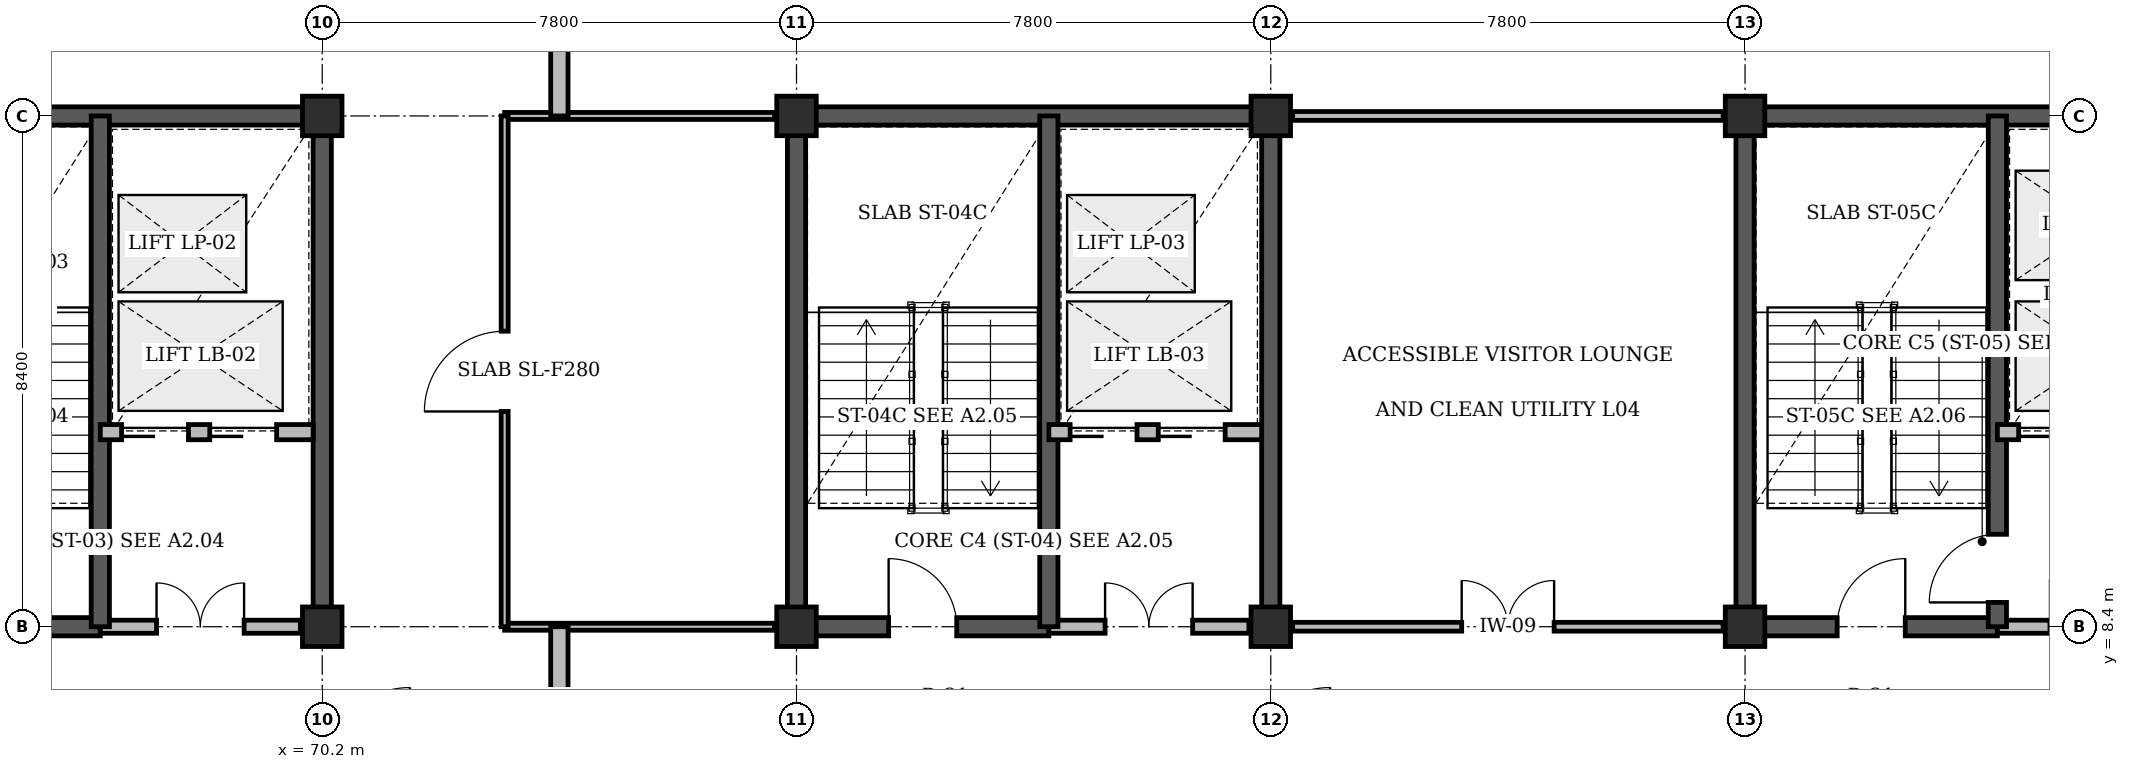
"""IFC4 building model, lengths in metres.
Left out: names, types, materials, properties, quantities, classifications, styles, units other than length and angle.
Written with IfcOpenShell. Run it as: python <this file> out.ifc"""

import sys

from ifc_helpers import new_model, si_unit, direction, frame, frame_2d, origin, origin_2d, place, context, subcontext, project, spatial, rectangle, extrude, element, fill, save


model = new_model("IFC4")
c1 = context("Model", 3, precision=1e-05, world=origin(), true_north=direction((0.0, 1.0)))
c2 = subcontext(c1, "Body", "Model", "MODEL_VIEW")
j1 = project(units=[si_unit("LENGTHUNIT", "METRE"), si_unit("PLANEANGLEUNIT", "RADIAN")], contexts=[c1])
p1 = place(None, origin())
s1 = spatial("IfcSite", under=j1, at=p1, CompositionType="ELEMENT")
p2 = place(p1, origin())
s2 = spatial("IfcBuilding", under=s1, at=p2, CompositionType="ELEMENT")
p3 = place(p2, frame((0.0, 0.0, 18.0)))
s3 = spatial("IfcBuildingStorey", under=s2, at=p3, CompositionType="ELEMENT", Elevation=18.0)
p4 = place(p3, frame((62.25, 16.8, 0.0), z_axis=(0.0, 0.0, 1.0), x_axis=(1.0, 0.0, 0.0)))
e1 = element("IfcWall", 1, at=p4, inside=s3, PredefinedType="SHEAR", context=c2, shape_type="SweptSolid", body=[
    extrude(rectangle(XDim=8.1, YDim=0.3, at=frame_2d((4.05, 0.0))), origin(), (0.0, 0.0, 1.0), 3.92),
])
p5 = place(p3, frame((70.2, 8.4, 0.0), z_axis=(0.0, 0.0, 1.0), x_axis=(0.0, 1.0, 0.0)))
e2 = element("IfcWall", 2, at=p5, inside=s3, PredefinedType="SHEAR", context=c2, shape_type="SweptSolid", body=[
    extrude(rectangle(XDim=8.4, YDim=0.3, at=frame_2d((4.2, 0.0))), origin(), (0.0, 0.0, 1.0), 3.92),
])
p6 = place(p3, frame((77.85, 16.8, 0.0), z_axis=(0.0, 0.0, 1.0), x_axis=(1.0, 0.0, 0.0)))
e3 = element("IfcWall", 3, at=p6, inside=s3, PredefinedType="SHEAR", context=c2, shape_type="SweptSolid", body=[
    extrude(rectangle(XDim=8.1, YDim=0.3, at=frame_2d((4.05, 0.0))), origin(), (0.0, 0.0, 1.0), 3.92),
])
for number, where, z_axis, x_axis in (
    (4, (78.0, 8.4, 0.0), (0.0, 0.0, 1.0), (0.0, 1.0, 0.0)),
    (5, (85.8, 8.4, 0.0), (0.0, 0.0, 1.0), (0.0, 1.0, 0.0)),
):
    element("IfcWall", number, at=place(p3, frame(where, z_axis=z_axis, x_axis=x_axis)), inside=s3, PredefinedType="SHEAR", context=c2, shape_type="SweptSolid", body=[
        extrude(rectangle(XDim=8.4, YDim=0.3, at=frame_2d((4.2, 0.0))), origin(), (0.0, 0.0, 1.0), 3.92),
    ])
p7 = place(p3, frame((93.45, 16.8, 0.0), z_axis=(0.0, 0.0, 1.0), x_axis=(1.0, 0.0, 0.0)))
e6 = element("IfcWall", 6, at=p7, inside=s3, PredefinedType="SHEAR", context=c2, shape_type="SweptSolid", body=[
    extrude(rectangle(XDim=8.1, YDim=0.3, at=frame_2d((4.05, 0.0))), origin(), (0.0, 0.0, 1.0), 3.92),
])
p8 = place(p3, frame((93.6, 8.4, 0.0), z_axis=(0.0, 0.0, 1.0), x_axis=(0.0, 1.0, 0.0)))
e7 = element("IfcWall", 7, at=p8, inside=s3, PredefinedType="SHEAR", context=c2, shape_type="SweptSolid", body=[
    extrude(rectangle(XDim=8.4, YDim=0.3, at=frame_2d((4.2, 0.0))), origin(), (0.0, 0.0, 1.0), 3.92),
])
for number, where, z_axis, x_axis in (
    (8, (70.2, 8.4, 0.0), (0.0, 0.0, 1.0), (1.0, 0.0, 0.0)),
    (9, (70.2, 16.8, 0.0), (0.0, 0.0, 1.0), (1.0, 0.0, 0.0)),
    (10, (78.0, 8.4, 0.0), (0.0, 0.0, 1.0), (1.0, 0.0, 0.0)),
    (11, (78.0, 16.8, 0.0), (0.0, 0.0, 1.0), (1.0, 0.0, 0.0)),
    (12, (85.8, 8.4, 0.0), (0.0, 0.0, 1.0), (1.0, 0.0, 0.0)),
    (13, (85.8, 16.8, 0.0), (0.0, 0.0, 1.0), (1.0, 0.0, 0.0)),
    (14, (93.6, 8.4, 0.0), (0.0, 0.0, 1.0), (1.0, 0.0, 0.0)),
    (15, (93.6, 16.8, 0.0), (0.0, 0.0, 1.0), (1.0, 0.0, 0.0)),
):
    element("IfcColumn", number, at=place(p3, frame(where, z_axis=z_axis, x_axis=x_axis)), inside=s3, PredefinedType="COLUMN", context=c2, shape_type="SweptSolid", body=[
        extrude(rectangle(XDim=0.65, YDim=0.65, at=origin_2d()), origin(), (0.0, 0.0, 1.0), 4.2),
    ])
p9 = place(p3, frame((62.4, 8.4, 0.0), z_axis=(0.0, 0.0, 1.0), x_axis=(1.0, 0.0, 0.0)))
e16 = element("IfcWall", 16, at=p9, inside=s3, PredefinedType="SHEAR", context=c2, shape_type="SweptSolid", body=[
    extrude(rectangle(XDim=4.15, YDim=0.3, at=frame_2d((2.075, 0.0))), origin(), (0.0, 0.0, 1.0), 4.2),
])
p10 = place(p9, frame((1.515, 0.0, 0.0)))
e17 = element("IfcOpeningElement", 17, at=p10, cuts=e16, PredefinedType="OPENING", context=c2, shape_type="SweptSolid", body=[
    extrude(rectangle(XDim=1.12, YDim=2.15, at=frame_2d((0.56, 1.075))), frame((0.0, 0.16, 0.0), z_axis=(0.0, -1.0, 0.0), x_axis=(1.0, 0.0, 0.0)), (0.0, 0.0, 1.0), 0.32),
])
p11 = place(p3, frame((66.55, 8.4, 0.0), z_axis=(0.0, 0.0, 1.0), x_axis=(1.0, 0.0, 0.0)))
e18 = element("IfcWall", 18, at=p11, inside=s3, PredefinedType="STANDARD", context=c2, shape_type="SweptSolid", body=[
    extrude(rectangle(XDim=3.29, YDim=0.215, at=frame_2d((1.645, 0.0))), origin(), (0.0, 0.0, 1.0), 3.22),
])
p12 = place(p11, frame((0.925, 0.0, 0.0)))
e19 = element("IfcOpeningElement", 19, at=p12, cuts=e18, PredefinedType="OPENING", context=c2, shape_type="SweptSolid", body=[
    extrude(rectangle(XDim=1.44, YDim=2.2, at=frame_2d((0.72, 1.1))), frame((0.0, 0.118, 0.0), z_axis=(0.0, -1.0, 0.0), x_axis=(1.0, 0.0, 0.0)), (0.0, 0.0, 1.0), 0.235),
])
p13 = place(p3, frame((66.55, 8.4, 0.0), z_axis=(0.0, 0.0, 1.0), x_axis=(0.0, 1.0, 0.0)))
e20 = element("IfcWall", 20, at=p13, inside=s3, PredefinedType="SHEAR", context=c2, shape_type="SweptSolid", body=[
    extrude(rectangle(XDim=8.4, YDim=0.3, at=frame_2d((4.2, 0.0))), origin(), (0.0, 0.0, 1.0), 4.2),
])
p14 = place(p3, frame((66.55, 11.6, 0.0), z_axis=(0.0, 0.0, 1.0), x_axis=(1.0, 0.0, 0.0)))
e21 = element("IfcWall", 21, at=p14, inside=s3, PredefinedType="STANDARD", context=c2, shape_type="SweptSolid", body=[
    extrude(rectangle(XDim=3.5, YDim=0.25, at=frame_2d((1.75, 0.0))), origin(), (0.0, 0.0, 1.0), 3.9),
])
p15 = place(p14, frame((0.35, 0.0, 0.0)))
e22 = element("IfcOpeningElement", 22, at=p15, cuts=e21, PredefinedType="OPENING", context=c2, shape_type="SweptSolid", body=[
    extrude(rectangle(XDim=1.1, YDim=2.2, at=frame_2d((0.55, 1.1))), frame((0.0, 0.135, 0.0), z_axis=(0.0, -1.0, 0.0), x_axis=(1.0, 0.0, 0.0)), (0.0, 0.0, 1.0), 0.27),
])
p16 = place(p14, frame((1.8, 0.0, 0.0)))
e23 = element("IfcOpeningElement", 23, at=p16, cuts=e21, PredefinedType="OPENING", context=c2, shape_type="SweptSolid", body=[
    extrude(rectangle(XDim=1.1, YDim=2.2, at=frame_2d((0.55, 1.1))), frame((0.0, 0.135, 0.0), z_axis=(0.0, -1.0, 0.0), x_axis=(1.0, 0.0, 0.0)), (0.0, 0.0, 1.0), 0.27),
])
p17 = place(p3, frame((78.0, 8.4, 0.0), z_axis=(0.0, 0.0, 1.0), x_axis=(1.0, 0.0, 0.0)))
e24 = element("IfcWall", 24, at=p17, inside=s3, PredefinedType="SHEAR", context=c2, shape_type="SweptSolid", body=[
    extrude(rectangle(XDim=4.15, YDim=0.3, at=frame_2d((2.075, 0.0))), origin(), (0.0, 0.0, 1.0), 4.2),
])
p18 = place(p17, frame((1.515, 0.0, 0.0)))
e25 = element("IfcOpeningElement", 25, at=p18, cuts=e24, PredefinedType="OPENING", context=c2, shape_type="SweptSolid", body=[
    extrude(rectangle(XDim=1.12, YDim=2.15, at=frame_2d((0.56, 1.075))), frame((0.0, 0.16, 0.0), z_axis=(0.0, -1.0, 0.0), x_axis=(1.0, 0.0, 0.0)), (0.0, 0.0, 1.0), 0.32),
])
p19 = place(p3, frame((82.15, 8.4, 0.0), z_axis=(0.0, 0.0, 1.0), x_axis=(1.0, 0.0, 0.0)))
e26 = element("IfcWall", 26, at=p19, inside=s3, PredefinedType="STANDARD", context=c2, shape_type="SweptSolid", body=[
    extrude(rectangle(XDim=3.29, YDim=0.215, at=frame_2d((1.645, 0.0))), origin(), (0.0, 0.0, 1.0), 3.22),
])
p20 = place(p19, frame((0.925, 0.0, 0.0)))
e27 = element("IfcOpeningElement", 27, at=p20, cuts=e26, PredefinedType="OPENING", context=c2, shape_type="SweptSolid", body=[
    extrude(rectangle(XDim=1.44, YDim=2.2, at=frame_2d((0.72, 1.1))), frame((0.0, 0.118, 0.0), z_axis=(0.0, -1.0, 0.0), x_axis=(1.0, 0.0, 0.0)), (0.0, 0.0, 1.0), 0.235),
])
p21 = place(p3, frame((82.15, 8.4, 0.0), z_axis=(0.0, 0.0, 1.0), x_axis=(0.0, 1.0, 0.0)))
e28 = element("IfcWall", 28, at=p21, inside=s3, PredefinedType="SHEAR", context=c2, shape_type="SweptSolid", body=[
    extrude(rectangle(XDim=8.4, YDim=0.3, at=frame_2d((4.2, 0.0))), origin(), (0.0, 0.0, 1.0), 4.2),
])
p22 = place(p3, frame((82.15, 11.6, 0.0), z_axis=(0.0, 0.0, 1.0), x_axis=(1.0, 0.0, 0.0)))
e29 = element("IfcWall", 29, at=p22, inside=s3, PredefinedType="STANDARD", context=c2, shape_type="SweptSolid", body=[
    extrude(rectangle(XDim=3.5, YDim=0.25, at=frame_2d((1.75, 0.0))), origin(), (0.0, 0.0, 1.0), 3.9),
])
p23 = place(p22, frame((0.35, 0.0, 0.0)))
e30 = element("IfcOpeningElement", 30, at=p23, cuts=e29, PredefinedType="OPENING", context=c2, shape_type="SweptSolid", body=[
    extrude(rectangle(XDim=1.1, YDim=2.2, at=frame_2d((0.55, 1.1))), frame((0.0, 0.135, 0.0), z_axis=(0.0, -1.0, 0.0), x_axis=(1.0, 0.0, 0.0)), (0.0, 0.0, 1.0), 0.27),
])
p24 = place(p22, frame((1.8, 0.0, 0.0)))
e31 = element("IfcOpeningElement", 31, at=p24, cuts=e29, PredefinedType="OPENING", context=c2, shape_type="SweptSolid", body=[
    extrude(rectangle(XDim=1.1, YDim=2.2, at=frame_2d((0.55, 1.1))), frame((0.0, 0.135, 0.0), z_axis=(0.0, -1.0, 0.0), x_axis=(1.0, 0.0, 0.0)), (0.0, 0.0, 1.0), 0.27),
])
p25 = place(p3, frame((93.6, 8.4, 0.0), z_axis=(0.0, 0.0, 1.0), x_axis=(1.0, 0.0, 0.0)))
e32 = element("IfcWall", 32, at=p25, inside=s3, PredefinedType="SHEAR", context=c2, shape_type="SweptSolid", body=[
    extrude(rectangle(XDim=4.15, YDim=0.3, at=frame_2d((2.075, 0.0))), origin(), (0.0, 0.0, 1.0), 4.2),
])
p26 = place(p25, frame((1.515, 0.0, 0.0)))
e33 = element("IfcOpeningElement", 33, at=p26, cuts=e32, PredefinedType="OPENING", context=c2, shape_type="SweptSolid", body=[
    extrude(rectangle(XDim=1.12, YDim=2.15, at=frame_2d((0.56, 1.075))), frame((0.0, 0.16, 0.0), z_axis=(0.0, -1.0, 0.0), x_axis=(1.0, 0.0, 0.0)), (0.0, 0.0, 1.0), 0.32),
])
p27 = place(p3, frame((97.75, 8.4, 0.0), z_axis=(0.0, 0.0, 1.0), x_axis=(1.0, 0.0, 0.0)))
e34 = element("IfcWall", 34, at=p27, inside=s3, PredefinedType="STANDARD", context=c2, shape_type="SweptSolid", body=[
    extrude(rectangle(XDim=3.29, YDim=0.215, at=frame_2d((1.645, 0.0))), origin(), (0.0, 0.0, 1.0), 3.22),
])
p28 = place(p27, frame((0.865, 0.0, 0.0)))
e35 = element("IfcOpeningElement", 35, at=p28, cuts=e34, PredefinedType="OPENING", context=c2, shape_type="SweptSolid", body=[
    extrude(rectangle(XDim=1.56, YDim=2.2, at=frame_2d((0.78, 1.1))), frame((0.0, 0.118, 0.0), z_axis=(0.0, -1.0, 0.0), x_axis=(1.0, 0.0, 0.0)), (0.0, 0.0, 1.0), 0.235),
])
p29 = place(p3, frame((97.75, 8.4, 0.0), z_axis=(0.0, 0.0, 1.0), x_axis=(0.0, 1.0, 0.0)))
e36 = element("IfcWall", 36, at=p29, inside=s3, PredefinedType="SHEAR", context=c2, shape_type="SweptSolid", body=[
    extrude(rectangle(XDim=8.4, YDim=0.3, at=frame_2d((4.2, 0.0))), origin(), (0.0, 0.0, 1.0), 4.2),
])
p30 = place(p29, frame((0.4, 0.0, 0.0)))
e37 = element("IfcOpeningElement", 37, at=p30, cuts=e36, PredefinedType="OPENING", context=c2, shape_type="SweptSolid", body=[
    extrude(rectangle(XDim=1.12, YDim=2.15, at=frame_2d((0.56, 1.075))), frame((0.0, 0.16, 0.0), z_axis=(0.0, -1.0, 0.0), x_axis=(1.0, 0.0, 0.0)), (0.0, 0.0, 1.0), 0.32),
])
p31 = place(p3, frame((97.75, 11.6, 0.0), z_axis=(0.0, 0.0, 1.0), x_axis=(1.0, 0.0, 0.0)))
e38 = element("IfcWall", 38, at=p31, inside=s3, PredefinedType="STANDARD", context=c2, shape_type="SweptSolid", body=[
    extrude(rectangle(XDim=3.5, YDim=0.25, at=frame_2d((1.75, 0.0))), origin(), (0.0, 0.0, 1.0), 3.9),
])
p32 = place(p31, frame((0.35, 0.0, 0.0)))
e39 = element("IfcOpeningElement", 39, at=p32, cuts=e38, PredefinedType="OPENING", context=c2, shape_type="SweptSolid", body=[
    extrude(rectangle(XDim=1.1, YDim=2.2, at=frame_2d((0.55, 1.1))), frame((0.0, 0.135, 0.0), z_axis=(0.0, -1.0, 0.0), x_axis=(1.0, 0.0, 0.0)), (0.0, 0.0, 1.0), 0.27),
])
p33 = place(p31, frame((1.8, 0.0, 0.0)))
e40 = element("IfcOpeningElement", 40, at=p33, cuts=e38, PredefinedType="OPENING", context=c2, shape_type="SweptSolid", body=[
    extrude(rectangle(XDim=1.1, YDim=2.2, at=frame_2d((0.55, 1.1))), frame((0.0, 0.135, 0.0), z_axis=(0.0, -1.0, 0.0), x_axis=(1.0, 0.0, 0.0)), (0.0, 0.0, 1.0), 0.27),
])
for number, where, z_axis, x_axis in (
    (41, (73.2, 8.4, 0.0), (0.0, 0.0, 1.0), (1.0, 0.0, 0.0)),
    (42, (73.2, 16.8, 0.0), (0.0, 0.0, 1.0), (1.0, 0.0, 0.0)),
):
    element("IfcWall", number, at=place(p3, frame(where, z_axis=z_axis, x_axis=x_axis)), inside=s3, PredefinedType="PARTITIONING", context=c2, shape_type="SweptSolid", body=[
        extrude(rectangle(XDim=4.44, YDim=0.115, at=frame_2d((2.22, 0.0))), origin(), (0.0, 0.0, 1.0), 3.22),
    ])
p34 = place(p3, frame((73.2, 8.4, 0.0), z_axis=(0.0, 0.0, 1.0), x_axis=(0.0, 1.0, 0.0)))
e43 = element("IfcWall", 43, at=p34, inside=s3, PredefinedType="PARTITIONING", context=c2, shape_type="SweptSolid", body=[
    extrude(rectangle(XDim=8.4, YDim=0.115, at=frame_2d((4.2, 0.0))), origin(), (0.0, 0.0, 1.0), 3.9),
])
p35 = place(p34, frame((3.54, 0.0, 0.0)))
e44 = element("IfcOpeningElement", 44, at=p35, cuts=e43, PredefinedType="OPENING", context=c2, shape_type="SweptSolid", body=[
    extrude(rectangle(XDim=1.32, YDim=2.15, at=frame_2d((0.66, 1.075))), frame((0.0, 0.067, 0.0), z_axis=(0.0, -1.0, 0.0), x_axis=(1.0, 0.0, 0.0)), (0.0, 0.0, 1.0), 0.135),
])
p36 = place(p3, frame((86.16, 8.4, 0.0), z_axis=(0.0, 0.0, 1.0), x_axis=(1.0, 0.0, 0.0)))
e45 = element("IfcWall", 45, at=p36, inside=s3, PredefinedType="PARTITIONING", context=c2, shape_type="SweptSolid", body=[
    extrude(rectangle(XDim=7.08, YDim=0.145, at=frame_2d((3.54, 0.0))), origin(), (0.0, 0.0, 1.0), 3.22),
])
p37 = place(p36, frame((2.78, 0.0, 0.0)))
e46 = element("IfcOpeningElement", 46, at=p37, cuts=e45, PredefinedType="OPENING", context=c2, shape_type="SweptSolid", body=[
    extrude(rectangle(XDim=1.52, YDim=2.2, at=frame_2d((0.76, 1.1))), frame((0.0, 0.083, 0.0), z_axis=(0.0, -1.0, 0.0), x_axis=(1.0, 0.0, 0.0)), (0.0, 0.0, 1.0), 0.165),
])
p38 = place(p3, frame((86.16, 16.8, 0.0), z_axis=(0.0, 0.0, 1.0), x_axis=(1.0, 0.0, 0.0)))
e47 = element("IfcWall", 47, at=p38, inside=s3, PredefinedType="PARTITIONING", context=c2, shape_type="SweptSolid", body=[
    extrude(rectangle(XDim=7.08, YDim=0.145, at=frame_2d((3.54, 0.0))), origin(), (0.0, 0.0, 1.0), 3.22),
])
for number, where, z_axis, x_axis in (
    (48, (74.1, 6.0, 0.0), (0.0, 0.0, 1.0), (0.0, 1.0, 0.0)),
    (49, (74.1, 16.8, 0.0), (0.0, 0.0, 1.0), (0.0, 1.0, 0.0)),
):
    element("IfcWall", number, at=place(p3, frame(where, z_axis=z_axis, x_axis=x_axis)), inside=s3, PredefinedType="STANDARD", context=c2, shape_type="SweptSolid", body=[
        extrude(rectangle(XDim=2.4, YDim=0.285, at=frame_2d((1.2, 0.0))), origin(), (0.0, 0.0, 1.0), 3.9),
    ])
p39 = place(p12, origin())
e50 = element("IfcDoor", 50, at=p39, inside=s3, OperationType="DOUBLE_DOOR_SINGLE_SWING", PredefinedType="DOOR", context=c2, shape_type="SweptSolid", body=[
    extrude(rectangle(XDim=1.44, YDim=2.2, at=frame_2d((0.72, 1.1))), frame((0.0, 0.025, 0.0), z_axis=(0.0, -1.0, 0.0), x_axis=(1.0, 0.0, 0.0)), (0.0, 0.0, 1.0), 0.05),
])
fill(e19, e50)
p40 = place(p15, origin())
e51 = element("IfcDoor", 51, at=p40, inside=s3, OperationType="SLIDING_TO_LEFT", PredefinedType="DOOR", context=c2, shape_type="SweptSolid", body=[
    extrude(rectangle(XDim=1.1, YDim=2.2, at=frame_2d((0.55, 1.1))), frame((0.0, 0.025, 0.0), z_axis=(0.0, -1.0, 0.0), x_axis=(1.0, 0.0, 0.0)), (0.0, 0.0, 1.0), 0.05),
])
fill(e22, e51)
p41 = place(p16, origin())
e52 = element("IfcDoor", 52, at=p41, inside=s3, OperationType="SLIDING_TO_LEFT", PredefinedType="DOOR", context=c2, shape_type="SweptSolid", body=[
    extrude(rectangle(XDim=1.1, YDim=2.2, at=frame_2d((0.55, 1.1))), frame((0.0, 0.025, 0.0), z_axis=(0.0, -1.0, 0.0), x_axis=(1.0, 0.0, 0.0)), (0.0, 0.0, 1.0), 0.05),
])
fill(e23, e52)
p42 = place(p18, origin())
e53 = element("IfcDoor", 53, at=p42, inside=s3, OperationType="SINGLE_SWING_LEFT", PredefinedType="DOOR", context=c2, shape_type="SweptSolid", body=[
    extrude(rectangle(XDim=1.12, YDim=2.15, at=frame_2d((0.56, 1.075))), frame((0.0, 0.025, 0.0), z_axis=(0.0, -1.0, 0.0), x_axis=(1.0, 0.0, 0.0)), (0.0, 0.0, 1.0), 0.05),
])
fill(e25, e53)
p43 = place(p20, origin())
e54 = element("IfcDoor", 54, at=p43, inside=s3, OperationType="DOUBLE_DOOR_SINGLE_SWING", PredefinedType="DOOR", context=c2, shape_type="SweptSolid", body=[
    extrude(rectangle(XDim=1.44, YDim=2.2, at=frame_2d((0.72, 1.1))), frame((0.0, 0.025, 0.0), z_axis=(0.0, -1.0, 0.0), x_axis=(1.0, 0.0, 0.0)), (0.0, 0.0, 1.0), 0.05),
])
fill(e27, e54)
p44 = place(p23, origin())
e55 = element("IfcDoor", 55, at=p44, inside=s3, OperationType="SLIDING_TO_LEFT", PredefinedType="DOOR", context=c2, shape_type="SweptSolid", body=[
    extrude(rectangle(XDim=1.1, YDim=2.2, at=frame_2d((0.55, 1.1))), frame((0.0, 0.025, 0.0), z_axis=(0.0, -1.0, 0.0), x_axis=(1.0, 0.0, 0.0)), (0.0, 0.0, 1.0), 0.05),
])
fill(e30, e55)
p45 = place(p24, origin())
e56 = element("IfcDoor", 56, at=p45, inside=s3, OperationType="SLIDING_TO_LEFT", PredefinedType="DOOR", context=c2, shape_type="SweptSolid", body=[
    extrude(rectangle(XDim=1.1, YDim=2.2, at=frame_2d((0.55, 1.1))), frame((0.0, 0.025, 0.0), z_axis=(0.0, -1.0, 0.0), x_axis=(1.0, 0.0, 0.0)), (0.0, 0.0, 1.0), 0.05),
])
fill(e31, e56)
p46 = place(p26, origin())
e57 = element("IfcDoor", 57, at=p46, inside=s3, OperationType="SINGLE_SWING_RIGHT", PredefinedType="DOOR", context=c2, shape_type="SweptSolid", body=[
    extrude(rectangle(XDim=1.12, YDim=2.15, at=frame_2d((0.56, 1.075))), frame((0.0, 0.025, 0.0), z_axis=(0.0, -1.0, 0.0), x_axis=(1.0, 0.0, 0.0)), (0.0, 0.0, 1.0), 0.05),
])
fill(e33, e57)
p47 = place(p30, origin())
e58 = element("IfcDoor", 58, at=p47, inside=s3, OperationType="SINGLE_SWING_LEFT", PredefinedType="DOOR", context=c2, shape_type="SweptSolid", body=[
    extrude(rectangle(XDim=1.12, YDim=2.15, at=frame_2d((0.56, 1.075))), frame((0.0, 0.025, 0.0), z_axis=(0.0, -1.0, 0.0), x_axis=(1.0, 0.0, 0.0)), (0.0, 0.0, 1.0), 0.05),
])
fill(e37, e58)
p48 = place(p32, origin())
e59 = element("IfcDoor", 59, at=p48, inside=s3, OperationType="SLIDING_TO_LEFT", PredefinedType="DOOR", context=c2, shape_type="SweptSolid", body=[
    extrude(rectangle(XDim=1.1, YDim=2.2, at=frame_2d((0.55, 1.1))), frame((0.0, 0.025, 0.0), z_axis=(0.0, -1.0, 0.0), x_axis=(1.0, 0.0, 0.0)), (0.0, 0.0, 1.0), 0.05),
])
fill(e39, e59)
p49 = place(p35, origin())
e60 = element("IfcDoor", 60, at=p49, inside=s3, OperationType="SINGLE_SWING_LEFT", PredefinedType="DOOR", context=c2, shape_type="SweptSolid", body=[
    extrude(rectangle(XDim=1.32, YDim=2.15, at=frame_2d((0.66, 1.075))), frame((0.0, 0.025, 0.0), z_axis=(0.0, -1.0, 0.0), x_axis=(1.0, 0.0, 0.0)), (0.0, 0.0, 1.0), 0.05),
])
fill(e44, e60)
p50 = place(p37, origin())
e61 = element("IfcDoor", 61, at=p50, inside=s3, OperationType="DOUBLE_DOOR_SINGLE_SWING", PredefinedType="DOOR", context=c2, shape_type="SweptSolid", body=[
    extrude(rectangle(XDim=1.52, YDim=2.2, at=frame_2d((0.76, 1.1))), frame((0.0, 0.025, 0.0), z_axis=(0.0, -1.0, 0.0), x_axis=(1.0, 0.0, 0.0)), (0.0, 0.0, 1.0), 0.05),
])
fill(e46, e61)
save(model, sys.argv[1])
